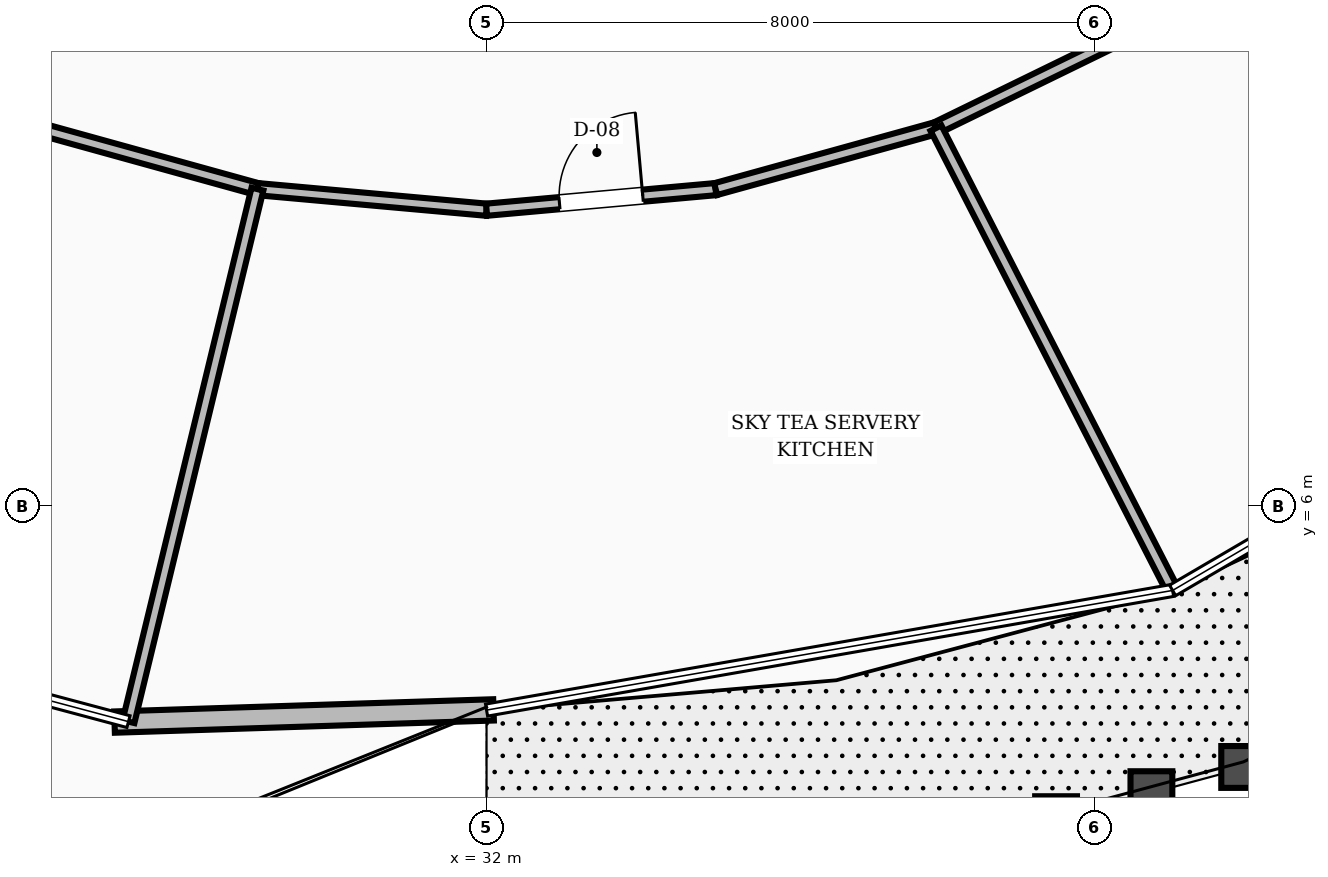
"""IFC4 building model, lengths in metres.
Left out: names, types, materials, properties, quantities, classifications, styles, units other than length and angle.
Written with IfcOpenShell. Run it as: python <this file> out.ifc"""

import sys

from ifc_helpers import new_model, si_unit, direction, frame, frame_2d, origin, place, context, subcontext, project, spatial, rectangle, extrude, element, fill, save


model = new_model("IFC4")
c1 = context("Model", 3, precision=1e-05, world=origin(), true_north=direction((0.0, 1.0)))
c2 = subcontext(c1, "Body", "Model", "MODEL_VIEW")
j1 = project(units=[si_unit("LENGTHUNIT", "METRE"), si_unit("PLANEANGLEUNIT", "RADIAN")], contexts=[c1])
p1 = place(None, origin())
s1 = spatial("IfcSite", under=j1, at=p1, CompositionType="ELEMENT")
p2 = place(p1, origin())
s2 = spatial("IfcBuilding", under=s1, at=p2, CompositionType="ELEMENT")
p3 = place(p2, frame((0.0, 0.0, 203.6)))
s3 = spatial("IfcBuildingStorey", under=s2, at=p3, CompositionType="ELEMENT", Elevation=203.6)
p4 = place(p3, frame((27.105, 3.159, 0.0), z_axis=(0.0, 0.0, 1.0), x_axis=(0.999479910851, 0.03224760153, 0.0)))
e1 = element("IfcWall", 1, at=p4, inside=s3, PredefinedType="STANDARD", context=c2, shape_type="SweptSolid", body=[
    extrude(rectangle(XDim=4.989, YDim=0.28, at=frame_2d((2.495, 0.0))), origin(), (0.0, 0.0, 1.0), 3.71),
])
p5 = place(p3, frame((26.087, 10.973, 0.0), z_axis=(0.0, 0.0, 1.0), x_axis=(0.963743190464, -0.26683152519, 0.0)))
e2 = element("IfcWall", 2, at=p5, inside=s3, PredefinedType="SOLIDWALL", context=c2, shape_type="SweptSolid", body=[
    extrude(rectangle(XDim=3.008, YDim=0.16, at=frame_2d((1.504, 0.0))), origin(), (0.0, 0.0, 1.0), 3.71),
])
p6 = place(p3, frame((28.986, 10.171, 0.0), z_axis=(0.0, 0.0, 1.0), x_axis=(0.995982645158, -0.089546471418, 0.0)))
e3 = element("IfcWall", 3, at=p6, inside=s3, PredefinedType="SOLIDWALL", context=c2, shape_type="SweptSolid", body=[
    extrude(rectangle(XDim=3.026, YDim=0.16, at=frame_2d((1.513, 0.0))), origin(), (0.0, 0.0, 1.0), 3.71),
])
p7 = place(p3, frame((32.0, 9.9, 0.0), z_axis=(0.0, 0.0, 1.0), x_axis=(0.995982645158, 0.089546471418, 0.0)))
e4 = element("IfcWall", 4, at=p7, inside=s3, PredefinedType="SOLIDWALL", context=c2, shape_type="SweptSolid", body=[
    extrude(rectangle(XDim=3.026, YDim=0.16, at=frame_2d((1.513, 0.0))), origin(), (0.0, 0.0, 1.0), 3.71),
])
p8 = place(p7, frame((0.963, 0.0, 0.0)))
e5 = element("IfcOpeningElement", 5, at=p8, cuts=e4, PredefinedType="OPENING", context=c2, shape_type="SweptSolid", body=[
    extrude(rectangle(XDim=1.1, YDim=2.1, at=frame_2d((0.55, 1.05))), frame((0.0, 0.09, 0.0), z_axis=(0.0, -1.0, 0.0), x_axis=(1.0, 0.0, 0.0)), (0.0, 0.0, 1.0), 0.18),
])
p9 = place(p3, frame((35.014, 10.171, 0.0), z_axis=(0.0, 0.0, 1.0), x_axis=(0.963743190464, 0.26683152519, 0.0)))
e6 = element("IfcWall", 6, at=p9, inside=s3, PredefinedType="SOLIDWALL", context=c2, shape_type="SweptSolid", body=[
    extrude(rectangle(XDim=3.008, YDim=0.16, at=frame_2d((1.504, 0.0))), origin(), (0.0, 0.0, 1.0), 3.71),
])
p10 = place(p3, frame((37.913, 10.973, 0.0), z_axis=(0.0, 0.0, 1.0), x_axis=(0.898755022802, 0.438451147778, 0.0)))
e7 = element("IfcWall", 7, at=p10, inside=s3, PredefinedType="SOLIDWALL", context=c2, shape_type="SweptSolid", body=[
    extrude(rectangle(XDim=2.972, YDim=0.16, at=frame_2d((1.486, 0.0))), origin(), (0.0, 0.0, 1.0), 3.71),
])
p11 = place(p3, frame((37.913, 10.973, 0.0), z_axis=(0.0, 0.0, 1.0), x_axis=(0.455654930069, -0.890156494502, 0.0)))
e8 = element("IfcWall", 8, at=p11, inside=s3, PredefinedType="SOLIDWALL", context=c2, shape_type="SweptSolid", body=[
    extrude(rectangle(XDim=6.833, YDim=0.16, at=frame_2d((3.416, 0.0))), origin(), (0.0, 0.0, 1.0), 3.71),
])
p12 = place(p3, frame((28.986, 10.171, 0.0), z_axis=(0.0, 0.0, 1.0), x_axis=(-0.235364454403, -0.971907183636, 0.0)))
e9 = element("IfcWall", 9, at=p12, inside=s3, PredefinedType="SOLIDWALL", context=c2, shape_type="SweptSolid", body=[
    extrude(rectangle(XDim=7.208, YDim=0.16, at=frame_2d((3.604, 0.0))), origin(), (0.0, 0.0, 1.0), 3.71),
])
p13 = place(p8, origin())
e10 = element("IfcDoor", 10, at=p13, inside=s3, OperationType="SINGLE_SWING_RIGHT", PredefinedType="DOOR", context=c2, shape_type="SweptSolid", body=[
    extrude(rectangle(XDim=1.1, YDim=2.1, at=frame_2d((0.55, 1.05))), frame((0.0, 0.025, 0.0), z_axis=(0.0, -1.0, 0.0), x_axis=(1.0, 0.0, 0.0)), (0.0, 0.0, 1.0), 0.05),
])
fill(e5, e10)
save(model, sys.argv[1])
